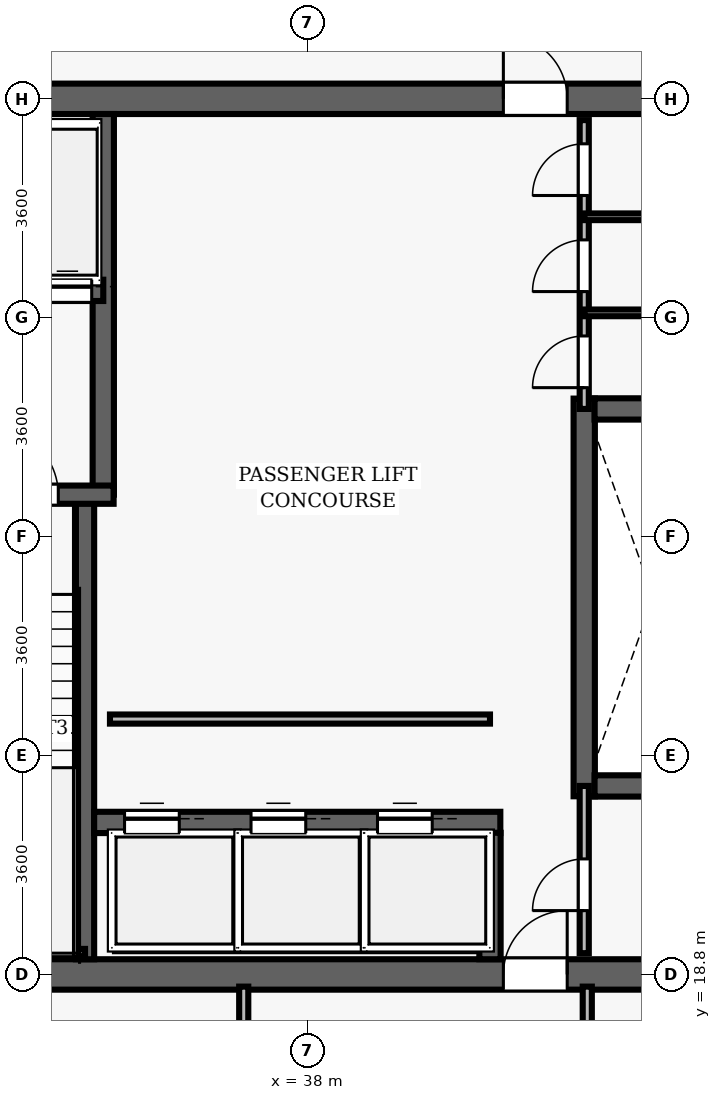
"""IFC4 building model, lengths in metres.
Left out: names, types, materials, properties, quantities, classifications, styles, units other than length and angle.
Written with IfcOpenShell. Run it as: python <this file> out.ifc"""

import sys

from ifc_helpers import new_model, si_unit, direction, frame, frame_2d, origin, place, context, subcontext, project, spatial, rectangle, extrude, element, fill, save


model = new_model("IFC4")
c1 = context("Model", 3, precision=1e-05, world=origin(), true_north=direction((0.0, 1.0)))
c2 = subcontext(c1, "Body", "Model", "MODEL_VIEW")
j1 = project(units=[si_unit("LENGTHUNIT", "METRE"), si_unit("PLANEANGLEUNIT", "RADIAN")], contexts=[c1])
p1 = place(None, origin())
s1 = spatial("IfcSite", under=j1, at=p1, CompositionType="ELEMENT")
p2 = place(p1, origin())
s2 = spatial("IfcBuilding", under=s1, at=p2, CompositionType="ELEMENT")
p3 = place(p2, frame((0.0, 0.0, 228.95)))
s3 = spatial("IfcBuildingStorey", under=s2, at=p3, CompositionType="ELEMENT", Elevation=228.95)
p4 = place(p3, frame((26.75, 18.8, 0.0), z_axis=(0.0, 0.0, 1.0), x_axis=(1.0, 0.0, 0.0)))
e1 = element("IfcWall", 1, at=p4, inside=s3, PredefinedType="SHEAR", context=c2, shape_type="SweptSolid", body=[
    extrude(rectangle(XDim=22.5, YDim=0.5, at=frame_2d((11.25, 0.0))), origin(), (0.0, 0.0, 1.0), 3.85),
])
p5 = place(p4, frame((14.47, 0.0, 0.0)))
e2 = element("IfcOpeningElement", 2, at=p5, cuts=e1, PredefinedType="OPENING", context=c2, shape_type="SweptSolid", body=[
    extrude(rectangle(XDim=1.05, YDim=2.15, at=frame_2d((0.525, 1.075))), frame((0.0, 0.26, 0.0), z_axis=(0.0, -1.0, 0.0), x_axis=(1.0, 0.0, 0.0)), (0.0, 0.0, 1.0), 0.52),
])
p6 = place(p3, frame((26.75, 33.2, 0.0), z_axis=(0.0, 0.0, 1.0), x_axis=(1.0, 0.0, 0.0)))
e3 = element("IfcWall", 3, at=p6, inside=s3, PredefinedType="SHEAR", context=c2, shape_type="SweptSolid", body=[
    extrude(rectangle(XDim=22.5, YDim=0.5, at=frame_2d((11.25, 0.0))), origin(), (0.0, 0.0, 1.0), 3.85),
])
p7 = place(p6, frame((4.57, 0.0, 0.0)))
e4 = element("IfcOpeningElement", 4, at=p7, cuts=e3, PredefinedType="OPENING", context=c2, shape_type="SweptSolid", body=[
    extrude(rectangle(XDim=1.05, YDim=2.15, at=frame_2d((0.525, 1.075))), frame((0.0, 0.26, 0.0), z_axis=(0.0, -1.0, 0.0), x_axis=(1.0, 0.0, 0.0)), (0.0, 0.0, 1.0), 0.52),
])
p8 = place(p6, frame((14.47, 0.0, 0.0)))
e5 = element("IfcOpeningElement", 5, at=p8, cuts=e3, PredefinedType="OPENING", context=c2, shape_type="SweptSolid", body=[
    extrude(rectangle(XDim=1.05, YDim=2.15, at=frame_2d((0.525, 1.075))), frame((0.0, 0.26, 0.0), z_axis=(0.0, -1.0, 0.0), x_axis=(1.0, 0.0, 0.0)), (0.0, 0.0, 1.0), 0.52),
])
p9 = place(p3, frame((34.34, 19.05, 0.0), z_axis=(0.0, 0.0, 1.0), x_axis=(0.0, 1.0, 0.0)))
e6 = element("IfcWall", 6, at=p9, inside=s3, PredefinedType="SHEAR", context=c2, shape_type="SweptSolid", body=[
    extrude(rectangle(XDim=7.5, YDim=0.3, at=frame_2d((3.75, 0.0))), origin(), (0.0, 0.0, 1.0), 3.85),
])
p10 = place(p3, frame((34.64, 26.69, 0.0), z_axis=(0.0, 0.0, 1.0), x_axis=(0.0, 1.0, 0.0)))
e7 = element("IfcWall", 7, at=p10, inside=s3, PredefinedType="SHEAR", context=c2, shape_type="SweptSolid", body=[
    extrude(rectangle(XDim=6.26, YDim=0.35, at=frame_2d((3.13, 0.0))), origin(), (0.0, 0.0, 1.0), 3.85),
])
p11 = place(p3, frame((31.25, 26.69, 0.0), z_axis=(0.0, 0.0, 1.0), x_axis=(1.0, 0.0, 0.0)))
e8 = element("IfcWall", 8, at=p11, inside=s3, PredefinedType="SHEAR", context=c2, shape_type="SweptSolid", body=[
    extrude(rectangle(XDim=3.56, YDim=0.3, at=frame_2d((1.78, 0.0))), origin(), (0.0, 0.0, 1.0), 3.85),
])
p12 = place(p11, frame((1.55, 0.0, 0.0)))
e9 = element("IfcOpeningElement", 9, at=p12, cuts=e8, PredefinedType="OPENING", context=c2, shape_type="SweptSolid", body=[
    extrude(rectangle(XDim=1.1, YDim=2.15, at=frame_2d((0.55, 1.075))), frame((0.0, 0.16, 0.0), z_axis=(0.0, -1.0, 0.0), x_axis=(1.0, 0.0, 0.0)), (0.0, 0.0, 1.0), 0.32),
])
p13 = place(p3, frame((31.3, 19.16, 0.0), z_axis=(0.0, 0.0, 1.0), x_axis=(1.0, 0.0, 0.0)))
e10 = element("IfcWall", 10, at=p13, inside=s3, PredefinedType="SHEAR", context=c2, shape_type="SweptSolid", body=[
    extrude(rectangle(XDim=3.04, YDim=0.12, at=frame_2d((1.52, 0.0))), origin(), (0.0, 0.0, 1.0), 3.85),
])
p14 = place(p3, frame((32.23, 30.05, 0.0), z_axis=(0.0, 0.0, 1.0), x_axis=(1.0, 0.0, 0.0)))
e11 = element("IfcWall", 11, at=p14, inside=s3, PredefinedType="SHEAR", context=c2, shape_type="SweptSolid", body=[
    extrude(rectangle(XDim=2.41, YDim=0.35, at=frame_2d((1.205, 0.0))), origin(), (0.0, 0.0, 1.0), 3.035),
])
p15 = place(p14, frame((0.42, 0.0, 0.0)))
e12 = element("IfcOpeningElement", 12, at=p15, cuts=e11, PredefinedType="OPENING", context=c2, shape_type="SweptSolid", body=[
    extrude(rectangle(XDim=0.8, YDim=2.15, at=frame_2d((0.4, 1.075))), frame((0.0, 0.185, 0.0), z_axis=(0.0, -1.0, 0.0), x_axis=(1.0, 0.0, 0.0)), (0.0, 0.0, 1.0), 0.37),
])
p16 = place(p14, frame((1.42, 0.0, 0.0)))
e13 = element("IfcOpeningElement", 13, at=p16, cuts=e11, PredefinedType="OPENING", context=c2, shape_type="SweptSolid", body=[
    extrude(rectangle(XDim=0.8, YDim=2.15, at=frame_2d((0.4, 1.075))), frame((0.0, 0.185, 0.0), z_axis=(0.0, -1.0, 0.0), x_axis=(1.0, 0.0, 0.0)), (0.0, 0.0, 1.0), 0.37),
])
p17 = place(p3, frame((42.55, 21.73, 0.0), z_axis=(0.0, 0.0, 1.0), x_axis=(0.0, 1.0, 0.0)))
e14 = element("IfcWall", 14, at=p17, inside=s3, PredefinedType="SHEAR", context=c2, shape_type="SweptSolid", body=[
    extrude(rectangle(XDim=6.54, YDim=0.35, at=frame_2d((3.27, 0.0))), origin(), (0.0, 0.0, 1.0), 3.035),
])
for number, where, z_axis, x_axis in (
    (15, (42.72, 21.9, 0.0), (0.0, 0.0, 1.0), (1.0, 0.0, 0.0)),
    (16, (42.72, 28.1, 0.0), (0.0, 0.0, 1.0), (1.0, 0.0, 0.0)),
):
    element("IfcWall", number, at=place(p3, frame(where, z_axis=z_axis, x_axis=x_axis)), inside=s3, PredefinedType="SHEAR", context=c2, shape_type="SweptSolid", body=[
        extrude(rectangle(XDim=2.03, YDim=0.35, at=frame_2d((1.015, 0.0))), origin(), (0.0, 0.0, 1.0), 3.035),
    ])
p18 = place(p3, frame((34.49, 21.3, 0.0), z_axis=(0.0, 0.0, 1.0), x_axis=(1.0, 0.0, 0.0)))
e17 = element("IfcWall", 17, at=p18, inside=s3, PredefinedType="SHEAR", context=c2, shape_type="SweptSolid", body=[
    extrude(rectangle(XDim=6.68, YDim=0.35, at=frame_2d((3.34, 0.0))), origin(), (0.0, 0.0, 1.0), 3.035),
])
p19 = place(p18, frame((0.5, 0.0, 0.0)))
e18 = element("IfcOpeningElement", 18, at=p19, cuts=e17, PredefinedType="OPENING", context=c2, shape_type="SweptSolid", body=[
    extrude(rectangle(XDim=0.9, YDim=2.15, at=frame_2d((0.45, 1.075))), frame((0.0, 0.185, 0.0), z_axis=(0.0, -1.0, 0.0), x_axis=(1.0, 0.0, 0.0)), (0.0, 0.0, 1.0), 0.37),
])
p20 = place(p18, frame((2.58, 0.0, 0.0)))
e19 = element("IfcOpeningElement", 19, at=p20, cuts=e17, PredefinedType="OPENING", context=c2, shape_type="SweptSolid", body=[
    extrude(rectangle(XDim=0.9, YDim=2.15, at=frame_2d((0.45, 1.075))), frame((0.0, 0.185, 0.0), z_axis=(0.0, -1.0, 0.0), x_axis=(1.0, 0.0, 0.0)), (0.0, 0.0, 1.0), 0.37),
])
p21 = place(p18, frame((4.66, 0.0, 0.0)))
e20 = element("IfcOpeningElement", 20, at=p21, cuts=e17, PredefinedType="OPENING", context=c2, shape_type="SweptSolid", body=[
    extrude(rectangle(XDim=0.9, YDim=2.15, at=frame_2d((0.45, 1.075))), frame((0.0, 0.185, 0.0), z_axis=(0.0, -1.0, 0.0), x_axis=(1.0, 0.0, 0.0)), (0.0, 0.0, 1.0), 0.37),
])
p22 = place(p3, frame((41.0, 19.05, 0.0), z_axis=(0.0, 0.0, 1.0), x_axis=(0.0, 1.0, 0.0)))
e21 = element("IfcWall", 21, at=p22, inside=s3, PredefinedType="SHEAR", context=c2, shape_type="SweptSolid", body=[
    extrude(rectangle(XDim=2.08, YDim=0.35, at=frame_2d((1.04, 0.0))), origin(), (0.0, 0.0, 1.0), 3.035),
])
p23 = place(p3, frame((34.75, 23.0, 0.0), z_axis=(0.0, 0.0, 1.0), x_axis=(1.0, 0.0, 0.0)))
e22 = element("IfcWall", 22, at=p23, inside=s3, PredefinedType="PARTITIONING", context=c2, shape_type="SweptSolid", body=[
    extrude(rectangle(XDim=6.25, YDim=0.15, at=frame_2d((3.125, 0.0))), origin(), (0.0, 0.0, 1.0), 3.035),
])
p24 = place(p3, frame((42.55, 28.1, 0.0), z_axis=(0.0, 0.0, 1.0), x_axis=(0.0, 1.0, 0.0)))
e23 = element("IfcWall", 23, at=p24, inside=s3, PredefinedType="PARTITIONING", context=c2, shape_type="SweptSolid", body=[
    extrude(rectangle(XDim=4.75, YDim=0.15, at=frame_2d((2.375, 0.0))), origin(), (0.0, 0.0, 1.0), 3.035),
])
p25 = place(p24, frame((0.35, 0.0, 0.0)))
e24 = element("IfcOpeningElement", 24, at=p25, cuts=e23, PredefinedType="OPENING", context=c2, shape_type="SweptSolid", body=[
    extrude(rectangle(XDim=0.85, YDim=2.1, at=frame_2d((0.425, 1.05))), frame((0.0, 0.085, 0.0), z_axis=(0.0, -1.0, 0.0), x_axis=(1.0, 0.0, 0.0)), (0.0, 0.0, 1.0), 0.17),
])
p26 = place(p24, frame((1.93, 0.0, 0.0)))
e25 = element("IfcOpeningElement", 25, at=p26, cuts=e23, PredefinedType="OPENING", context=c2, shape_type="SweptSolid", body=[
    extrude(rectangle(XDim=0.85, YDim=2.1, at=frame_2d((0.425, 1.05))), frame((0.0, 0.085, 0.0), z_axis=(0.0, -1.0, 0.0), x_axis=(1.0, 0.0, 0.0)), (0.0, 0.0, 1.0), 0.17),
])
p27 = place(p24, frame((3.51, 0.0, 0.0)))
e26 = element("IfcOpeningElement", 26, at=p27, cuts=e23, PredefinedType="OPENING", context=c2, shape_type="SweptSolid", body=[
    extrude(rectangle(XDim=0.85, YDim=2.1, at=frame_2d((0.425, 1.05))), frame((0.0, 0.085, 0.0), z_axis=(0.0, -1.0, 0.0), x_axis=(1.0, 0.0, 0.0)), (0.0, 0.0, 1.0), 0.17),
])
for number, where, z_axis, x_axis in (
    (27, (42.55, 29.68, 0.0), (0.0, 0.0, 1.0), (1.0, 0.0, 0.0)),
    (28, (42.55, 31.26, 0.0), (0.0, 0.0, 1.0), (1.0, 0.0, 0.0)),
):
    element("IfcWall", number, at=place(p3, frame(where, z_axis=z_axis, x_axis=x_axis)), inside=s3, PredefinedType="PARTITIONING", context=c2, shape_type="SweptSolid", body=[
        extrude(rectangle(XDim=2.2, YDim=0.11, at=frame_2d((1.1, 0.0))), origin(), (0.0, 0.0, 1.0), 3.035),
    ])
p28 = place(p3, frame((42.55, 19.15, 0.0), z_axis=(0.0, 0.0, 1.0), x_axis=(0.0, 1.0, 0.0)))
e29 = element("IfcWall", 29, at=p28, inside=s3, PredefinedType="PARTITIONING", context=c2, shape_type="SweptSolid", body=[
    extrude(rectangle(XDim=2.75, YDim=0.15, at=frame_2d((1.375, 0.0))), origin(), (0.0, 0.0, 1.0), 3.035),
])
p29 = place(p28, frame((0.7, 0.0, 0.0)))
e30 = element("IfcOpeningElement", 30, at=p29, cuts=e29, PredefinedType="OPENING", context=c2, shape_type="SweptSolid", body=[
    extrude(rectangle(XDim=0.85, YDim=2.1, at=frame_2d((0.425, 1.05))), frame((0.0, 0.085, 0.0), z_axis=(0.0, -1.0, 0.0), x_axis=(1.0, 0.0, 0.0)), (0.0, 0.0, 1.0), 0.17),
])
p30 = place(p3, frame((36.95, 11.2, 0.0), z_axis=(0.0, 0.0, 1.0), x_axis=(0.0, 1.0, 0.0)))
e31 = element("IfcWall", 31, at=p30, inside=s3, PredefinedType="PARTITIONING", context=c2, shape_type="SweptSolid", body=[
    extrude(rectangle(XDim=7.4, YDim=0.15, at=frame_2d((3.7, 0.0))), origin(), (0.0, 0.0, 1.0), 3.035),
])
p31 = place(p30, frame((5.075, 0.0, 0.0)))
e32 = element("IfcOpeningElement", 32, at=p31, cuts=e31, PredefinedType="OPENING", context=c2, shape_type="SweptSolid", body=[
    extrude(rectangle(XDim=0.95, YDim=2.15, at=frame_2d((0.475, 1.075))), frame((0.0, 0.085, 0.0), z_axis=(0.0, -1.0, 0.0), x_axis=(1.0, 0.0, 0.0)), (0.0, 0.0, 1.0), 0.17),
])
p32 = place(p3, frame((42.6, 16.65, 0.0), z_axis=(0.0, 0.0, 1.0), x_axis=(0.0, 1.0, 0.0)))
e33 = element("IfcWall", 33, at=p32, inside=s3, PredefinedType="PARTITIONING", context=c2, shape_type="SweptSolid", body=[
    extrude(rectangle(XDim=1.95, YDim=0.15, at=frame_2d((0.975, 0.0))), origin(), (0.0, 0.0, 1.0), 3.035),
])
p33 = place(p12, origin())
e34 = element("IfcDoor", 34, at=p33, inside=s3, OperationType="SINGLE_SWING_LEFT", PredefinedType="DOOR", context=c2, shape_type="SweptSolid", body=[
    extrude(rectangle(XDim=1.1, YDim=2.15, at=frame_2d((0.55, 1.075))), frame((0.0, 0.025, 0.0), z_axis=(0.0, -1.0, 0.0), x_axis=(1.0, 0.0, 0.0)), (0.0, 0.0, 1.0), 0.05),
])
fill(e9, e34)
p34 = place(p8, origin())
e35 = element("IfcDoor", 35, at=p34, inside=s3, OperationType="SINGLE_SWING_LEFT", PredefinedType="DOOR", context=c2, shape_type="SweptSolid", body=[
    extrude(rectangle(XDim=1.05, YDim=2.15, at=frame_2d((0.525, 1.075))), frame((0.0, 0.025, 0.0), z_axis=(0.0, -1.0, 0.0), x_axis=(1.0, 0.0, 0.0)), (0.0, 0.0, 1.0), 0.05),
])
fill(e5, e35)
p35 = place(p5, origin())
e36 = element("IfcDoor", 36, at=p35, inside=s3, OperationType="SINGLE_SWING_RIGHT", PredefinedType="DOOR", context=c2, shape_type="SweptSolid", body=[
    extrude(rectangle(XDim=1.05, YDim=2.15, at=frame_2d((0.525, 1.075))), frame((0.0, 0.025, 0.0), z_axis=(0.0, -1.0, 0.0), x_axis=(1.0, 0.0, 0.0)), (0.0, 0.0, 1.0), 0.05),
])
fill(e2, e36)
p36 = place(p25, origin())
e37 = element("IfcDoor", 37, at=p36, inside=s3, OperationType="SINGLE_SWING_LEFT", PredefinedType="DOOR", context=c2, shape_type="SweptSolid", body=[
    extrude(rectangle(XDim=0.85, YDim=2.1, at=frame_2d((0.425, 1.05))), frame((0.0, 0.025, 0.0), z_axis=(0.0, -1.0, 0.0), x_axis=(1.0, 0.0, 0.0)), (0.0, 0.0, 1.0), 0.05),
])
fill(e24, e37)
p37 = place(p26, origin())
e38 = element("IfcDoor", 38, at=p37, inside=s3, OperationType="SINGLE_SWING_LEFT", PredefinedType="DOOR", context=c2, shape_type="SweptSolid", body=[
    extrude(rectangle(XDim=0.85, YDim=2.1, at=frame_2d((0.425, 1.05))), frame((0.0, 0.025, 0.0), z_axis=(0.0, -1.0, 0.0), x_axis=(1.0, 0.0, 0.0)), (0.0, 0.0, 1.0), 0.05),
])
fill(e25, e38)
p38 = place(p27, origin())
e39 = element("IfcDoor", 39, at=p38, inside=s3, OperationType="SINGLE_SWING_LEFT", PredefinedType="DOOR", context=c2, shape_type="SweptSolid", body=[
    extrude(rectangle(XDim=0.85, YDim=2.1, at=frame_2d((0.425, 1.05))), frame((0.0, 0.025, 0.0), z_axis=(0.0, -1.0, 0.0), x_axis=(1.0, 0.0, 0.0)), (0.0, 0.0, 1.0), 0.05),
])
fill(e26, e39)
p39 = place(p29, origin())
e40 = element("IfcDoor", 40, at=p39, inside=s3, OperationType="SINGLE_SWING_LEFT", PredefinedType="DOOR", context=c2, shape_type="SweptSolid", body=[
    extrude(rectangle(XDim=0.85, YDim=2.1, at=frame_2d((0.425, 1.05))), frame((0.0, 0.025, 0.0), z_axis=(0.0, -1.0, 0.0), x_axis=(1.0, 0.0, 0.0)), (0.0, 0.0, 1.0), 0.05),
])
fill(e30, e40)
p40 = place(p19, origin())
e41 = element("IfcDoor", 41, at=p40, inside=s3, OperationType="SLIDING_TO_LEFT", PredefinedType="DOOR", context=c2, shape_type="SweptSolid", body=[
    extrude(rectangle(XDim=0.9, YDim=2.15, at=frame_2d((0.45, 1.075))), frame((0.0, 0.025, 0.0), z_axis=(0.0, -1.0, 0.0), x_axis=(1.0, 0.0, 0.0)), (0.0, 0.0, 1.0), 0.05),
])
fill(e18, e41)
p41 = place(p20, origin())
e42 = element("IfcDoor", 42, at=p41, inside=s3, OperationType="SLIDING_TO_LEFT", PredefinedType="DOOR", context=c2, shape_type="SweptSolid", body=[
    extrude(rectangle(XDim=0.9, YDim=2.15, at=frame_2d((0.45, 1.075))), frame((0.0, 0.025, 0.0), z_axis=(0.0, -1.0, 0.0), x_axis=(1.0, 0.0, 0.0)), (0.0, 0.0, 1.0), 0.05),
])
fill(e19, e42)
p42 = place(p21, origin())
e43 = element("IfcDoor", 43, at=p42, inside=s3, OperationType="SLIDING_TO_LEFT", PredefinedType="DOOR", context=c2, shape_type="SweptSolid", body=[
    extrude(rectangle(XDim=0.9, YDim=2.15, at=frame_2d((0.45, 1.075))), frame((0.0, 0.025, 0.0), z_axis=(0.0, -1.0, 0.0), x_axis=(1.0, 0.0, 0.0)), (0.0, 0.0, 1.0), 0.05),
])
fill(e20, e43)
p43 = place(p16, origin())
e44 = element("IfcDoor", 44, at=p43, inside=s3, OperationType="SLIDING_TO_LEFT", PredefinedType="DOOR", context=c2, shape_type="SweptSolid", body=[
    extrude(rectangle(XDim=0.8, YDim=2.15, at=frame_2d((0.4, 1.075))), frame((0.0, 0.025, 0.0), z_axis=(0.0, -1.0, 0.0), x_axis=(1.0, 0.0, 0.0)), (0.0, 0.0, 1.0), 0.05),
])
fill(e13, e44)
save(model, sys.argv[1])
